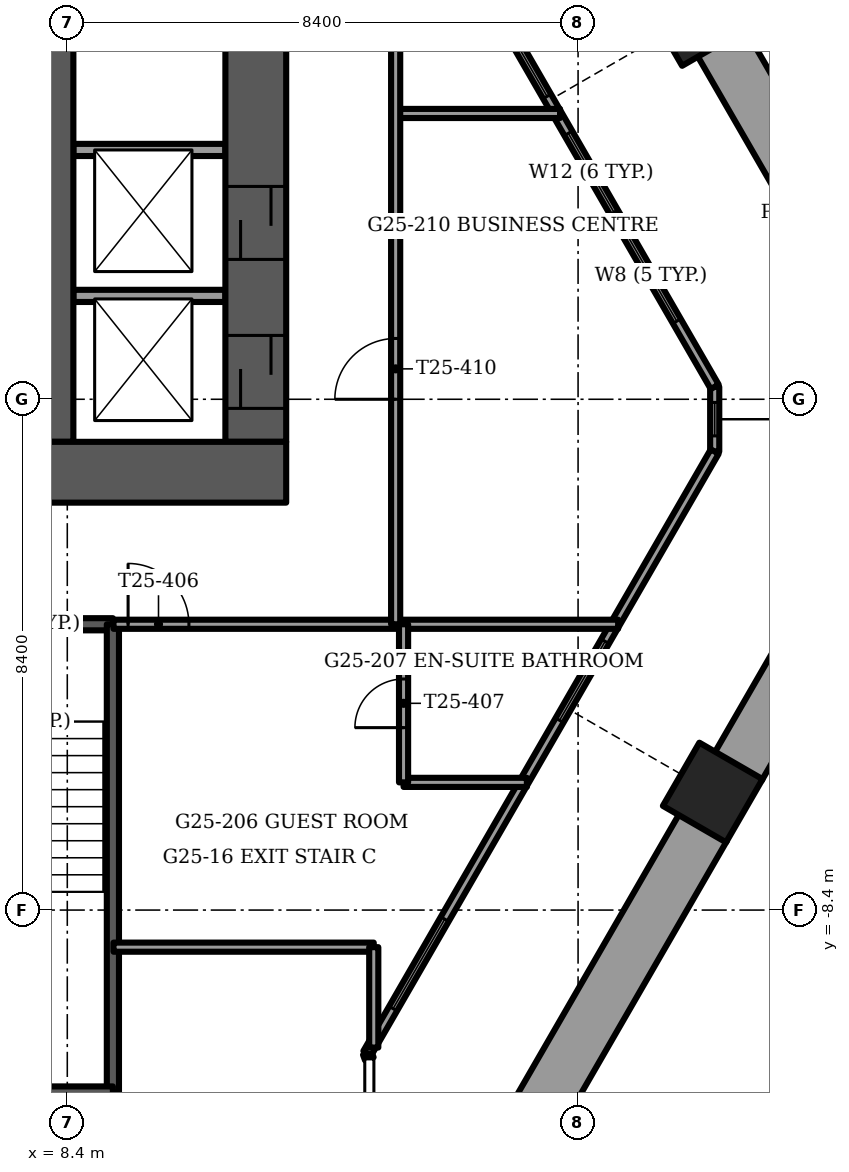
"""IFC4 building model, lengths in metres.
Left out: names, types, materials, properties, quantities, classifications, styles, units other than length and angle.
Written with IfcOpenShell. Run it as: python <this file> out.ifc"""

import sys

from ifc_helpers import new_model, si_unit, direction, frame, frame_2d, origin, origin_2d, place, context, subcontext, project, spatial, rectangle, extrude, element, fill, save


model = new_model("IFC4")
c1 = context("Model", 3, precision=1e-05, world=origin(), true_north=direction((0.0, 1.0)))
c2 = subcontext(c1, "Body", "Model", "MODEL_VIEW")
j1 = project(units=[si_unit("LENGTHUNIT", "METRE"), si_unit("PLANEANGLEUNIT", "RADIAN")], contexts=[c1])
p1 = place(None, origin())
s1 = spatial("IfcSite", under=j1, at=p1, CompositionType="ELEMENT")
p2 = place(p1, origin())
s2 = spatial("IfcBuilding", under=s1, at=p2, CompositionType="ELEMENT")
p3 = place(p2, frame((0.0, 0.0, 100.5)))
s3 = spatial("IfcBuildingStorey", under=s2, at=p3, CompositionType="ELEMENT", Elevation=100.5)
for number, where, z_axis, x_axis in (
    (1, (19.014, -6.467, -1.2), (0.0, 0.0, 1.0), (-0.5, -0.866, 0.0)),
    (2, (18.731, 6.303, -1.2), (0.0, 0.0, 1.0), (0.5, -0.866, 0.0)),
):
    element("IfcColumn", number, at=place(p3, frame(where, z_axis=z_axis, x_axis=x_axis)), inside=s3, PredefinedType="COLUMN", context=c2, shape_type="SweptSolid", body=[
        extrude(rectangle(XDim=1.2, YDim=1.2, at=origin_2d()), origin(), (0.0, 0.0, 1.0), 3.75),
    ])
p4 = place(p3, frame((-12.0, -1.2, -0.3), z_axis=(0.0, 0.0, 1.0), x_axis=(1.0, 0.0, 0.0)))
e3 = element("IfcWall", 3, at=p4, inside=s3, PredefinedType="SHEAR", context=c2, shape_type="SweptSolid", body=[
    extrude(rectangle(XDim=24.0, YDim=1.0, at=frame_2d((12.0, 0.0))), origin(), (0.0, 0.0, 1.0), 3.75),
])
p5 = place(p4, frame((11.2, 0.0, 0.0)))
e4 = element("IfcOpeningElement", 4, at=p5, cuts=e3, PredefinedType="OPENING", context=c2, shape_type="SweptSolid", body=[
    extrude(rectangle(XDim=1.6, YDim=2.1, at=frame_2d((0.8, 1.05))), frame((0.0, 0.5, 0.0), z_axis=(0.0, -1.0, 0.0), x_axis=(1.0, 0.0, 0.0)), (0.0, 0.0, 1.0), 1.0),
])
p6 = place(p3, frame((8.1, -0.7, -0.3), z_axis=(0.0, 0.0, 1.0), x_axis=(0.0, 1.0, 0.0)))
e5 = element("IfcWall", 5, at=p6, inside=s3, PredefinedType="SHEAR", context=c2, shape_type="SweptSolid", body=[
    extrude(rectangle(XDim=9.4, YDim=0.8, at=frame_2d((4.7, 0.0))), origin(), (0.0, 0.0, 1.0), 3.75),
])
p7 = place(p6, frame((7.95, 0.0, 0.0)))
e6 = element("IfcOpeningElement", 6, at=p7, cuts=e5, PredefinedType="OPENING", context=c2, shape_type="SweptSolid", body=[
    extrude(rectangle(XDim=1.1, YDim=2.1, at=frame_2d((0.55, 1.05))), frame((0.0, 0.4, 0.0), z_axis=(0.0, -1.0, 0.0), x_axis=(1.0, 0.0, 0.0)), (0.0, 0.0, 1.0), 0.8),
])
p8 = place(p3, frame((11.5, -0.7, -0.3), z_axis=(0.0, 0.0, 1.0), x_axis=(0.0, 1.0, 0.0)))
e7 = element("IfcWall", 7, at=p8, inside=s3, PredefinedType="SHEAR", context=c2, shape_type="SweptSolid", body=[
    extrude(rectangle(XDim=9.4, YDim=1.0, at=frame_2d((4.7, 0.0))), origin(), (0.0, 0.0, 1.0), 3.75),
])
p9 = place(p8, frame((8.15, 0.0, 0.0)))
e8 = element("IfcOpeningElement", 8, at=p9, cuts=e7, PredefinedType="OPENING", context=c2, shape_type="SweptSolid", body=[
    extrude(rectangle(XDim=1.1, YDim=2.1, at=frame_2d((0.55, 1.05))), frame((0.0, 0.5, 0.0), z_axis=(0.0, -1.0, 0.0), x_axis=(1.0, 0.0, 0.0)), (0.0, 0.0, 1.0), 1.0),
])
p10 = place(p8, frame((0.55, 0.0, 0.0)))
e9 = element("IfcOpeningElement", 9, at=p10, cuts=e7, PredefinedType="OPENING", context=c2, shape_type="SweptSolid", body=[
    extrude(rectangle(XDim=1.2, YDim=2.1, at=frame_2d((0.6, 1.05))), frame((0.0, 0.5, 0.0), z_axis=(0.0, -1.0, 0.0), x_axis=(1.0, 0.0, 0.0)), (0.0, 0.0, 1.0), 1.0),
])
p11 = place(p8, frame((3.0, 0.0, 0.0)))
e10 = element("IfcOpeningElement", 10, at=p11, cuts=e7, PredefinedType="OPENING", context=c2, shape_type="SweptSolid", body=[
    extrude(rectangle(XDim=1.2, YDim=2.1, at=frame_2d((0.6, 1.05))), frame((0.0, 0.5, 0.0), z_axis=(0.0, -1.0, 0.0), x_axis=(1.0, 0.0, 0.0)), (0.0, 0.0, 1.0), 1.0),
])
p12 = place(p3, frame((15.522, -12.815, 0.0), z_axis=(0.0, 0.0, 1.0), x_axis=(0.499999023957, 0.866025967302, 0.0)))
e11 = element("IfcWall", 11, at=p12, inside=s3, PredefinedType="PARAPET", context=c2, shape_type="SweptSolid", body=[
    extrude(rectangle(XDim=6.673, YDim=0.9, at=frame_2d((3.337, 0.0))), origin(), (0.0, 0.0, 1.0), 1.1),
])
p13 = place(p3, frame((19.429, -6.048, 0.0), z_axis=(0.0, 0.0, 1.0), x_axis=(0.500001626982, 0.866024464444, 0.0)))
e12 = element("IfcWall", 12, at=p13, inside=s3, PredefinedType="PARAPET", context=c2, shape_type="SweptSolid", body=[
    extrude(rectangle(XDim=5.955, YDim=0.9, at=frame_2d((2.978, 0.0))), origin(), (0.0, 0.0, 1.0), 1.1),
])
p14 = place(p3, frame((22.406, 0.236, 0.0), z_axis=(0.0, 0.0, 1.0), x_axis=(-0.500000042739, 0.866025379109, 0.0)))
e13 = element("IfcWall", 13, at=p14, inside=s3, PredefinedType="PARAPET", context=c2, shape_type="SweptSolid", body=[
    extrude(rectangle(XDim=6.522, YDim=0.9, at=frame_2d((3.261, 0.0))), origin(), (0.0, 0.0, 1.0), 1.1),
])
p15 = place(p3, frame((13.334, -10.755, 0.0), z_axis=(0.0, 0.0, 1.0), x_axis=(0.499999897272, 0.866025463095, 0.0)))
e14 = element("IfcWall", 14, at=p15, inside=s3, PredefinedType="SOLIDWALL", context=c2, shape_type="SweptSolid", body=[
    extrude(rectangle(XDim=11.426, YDim=0.15, at=frame_2d((5.713, 0.0))), origin(), (0.0, 0.0, 1.0), 3.45),
])
p16 = place(p15, frame((0.847, 0.0, 0.15)))
e15 = element("IfcOpeningElement", 15, at=p16, cuts=e14, PredefinedType="OPENING", context=c2, shape_type="SweptSolid", body=[
    extrude(rectangle(XDim=1.7, YDim=2.2, at=frame_2d((0.85, 1.1))), frame((0.0, 0.075, 0.0), z_axis=(0.0, -1.0, 0.0), x_axis=(1.0, 0.0, 0.0)), (0.0, 0.0, 1.0), 0.15),
])
p17 = place(p15, frame((6.322, 0.0, 0.15)))
e16 = element("IfcOpeningElement", 16, at=p17, cuts=e14, PredefinedType="OPENING", context=c2, shape_type="SweptSolid", body=[
    extrude(rectangle(XDim=1.5, YDim=2.2, at=frame_2d((0.75, 1.1))), frame((0.0, 0.075, 0.0), z_axis=(0.0, -1.0, 0.0), x_axis=(1.0, 0.0, 0.0)), (0.0, 0.0, 1.0), 0.15),
])
p18 = place(p3, frame((19.047, 0.205, 0.0), z_axis=(0.0, 0.0, 1.0), x_axis=(-0.499990645009, 0.866030804823, 0.0)))
e17 = element("IfcWall", 17, at=p18, inside=s3, PredefinedType="SOLIDWALL", context=c2, shape_type="SweptSolid", body=[
    extrude(rectangle(XDim=11.426, YDim=0.15, at=frame_2d((5.713, 0.0))), origin(), (0.0, 0.0, 1.0), 3.45),
])
p19 = place(p18, frame((1.246, 0.0, 0.15)))
e18 = element("IfcOpeningElement", 18, at=p19, cuts=e17, PredefinedType="OPENING", context=c2, shape_type="SweptSolid", body=[
    extrude(rectangle(XDim=1.7, YDim=2.2, at=frame_2d((0.85, 1.1))), frame((0.0, 0.075, 0.0), z_axis=(0.0, -1.0, 0.0), x_axis=(1.0, 0.0, 0.0)), (0.0, 0.0, 1.0), 0.15),
])
p20 = place(p18, frame((3.314, 0.0, 0.15)))
e19 = element("IfcOpeningElement", 19, at=p20, cuts=e17, PredefinedType="OPENING", context=c2, shape_type="SweptSolid", body=[
    extrude(rectangle(XDim=1.5, YDim=2.2, at=frame_2d((0.75, 1.1))), frame((0.0, 0.075, 0.0), z_axis=(0.0, -1.0, 0.0), x_axis=(1.0, 0.0, 0.0)), (0.0, 0.0, 1.0), 0.15),
])
p21 = place(p18, frame((5.514, 0.0, 0.15)))
e20 = element("IfcOpeningElement", 20, at=p21, cuts=e17, PredefinedType="OPENING", context=c2, shape_type="SweptSolid", body=[
    extrude(rectangle(XDim=1.7, YDim=2.2, at=frame_2d((0.85, 1.1))), frame((0.0, 0.075, 0.0), z_axis=(0.0, -1.0, 0.0), x_axis=(1.0, 0.0, 0.0)), (0.0, 0.0, 1.0), 0.15),
])
p22 = place(p18, frame((7.546, 0.0, 0.15)))
e21 = element("IfcOpeningElement", 21, at=p22, cuts=e17, PredefinedType="OPENING", context=c2, shape_type="SweptSolid", body=[
    extrude(rectangle(XDim=1.5, YDim=2.2, at=frame_2d((0.75, 1.1))), frame((0.0, 0.075, 0.0), z_axis=(0.0, -1.0, 0.0), x_axis=(1.0, 0.0, 0.0)), (0.0, 0.0, 1.0), 0.15),
])
p23 = place(p3, frame((19.047, -0.86, 0.0), z_axis=(0.0, 0.0, 1.0), x_axis=(0.0, 1.0, 0.0)))
e22 = element("IfcWall", 22, at=p23, inside=s3, PredefinedType="SOLIDWALL", context=c2, shape_type="SweptSolid", body=[
    extrude(rectangle(XDim=1.065, YDim=0.15, at=frame_2d((0.532, 0.0))), origin(), (0.0, 0.0, 1.0), 3.45),
])
p24 = place(p23, frame((0.258, 0.0, 0.15)))
e23 = element("IfcOpeningElement", 23, at=p24, cuts=e22, PredefinedType="OPENING", context=c2, shape_type="SweptSolid", body=[
    extrude(rectangle(XDim=0.55, YDim=2.2, at=frame_2d((0.275, 1.1))), frame((0.0, 0.075, 0.0), z_axis=(0.0, -1.0, 0.0), x_axis=(1.0, 0.0, 0.0)), (0.0, 0.0, 1.0), 0.15),
])
p25 = place(p3, frame((13.334, -10.755, 0.0), z_axis=(0.0, 0.0, 1.0), x_axis=(0.337751931921, -0.941235163221, 0.0)))
e24 = element("IfcWall", 24, at=p25, inside=s3, PredefinedType="SOLIDWALL", context=c2, shape_type="SweptSolid", body=[
    extrude(rectangle(XDim=0.098, YDim=0.15, at=frame_2d((0.049, 0.0))), origin(), (0.0, 0.0, 1.0), 3.45),
])
p26 = place(p3, frame((5.8, -3.7, -0.3), z_axis=(0.0, 0.0, 1.0), x_axis=(1.0, 0.0, 0.0)))
e25 = element("IfcWall", 25, at=p26, inside=s3, PredefinedType="SOLIDWALL", context=c2, shape_type="SweptSolid", body=[
    extrude(rectangle(XDim=3.35, YDim=0.2, at=frame_2d((1.675, 0.0))), origin(), (0.0, 0.0, 1.0), 3.75),
])
p27 = place(p26, frame((1.125, 0.0, 0.0)))
e26 = element("IfcOpeningElement", 26, at=p27, cuts=e25, PredefinedType="OPENING", context=c2, shape_type="SweptSolid", body=[
    extrude(rectangle(XDim=1.1, YDim=2.1, at=frame_2d((0.55, 1.05))), frame((0.0, 0.1, 0.0), z_axis=(0.0, -1.0, 0.0), x_axis=(1.0, 0.0, 0.0)), (0.0, 0.0, 1.0), 0.2),
])
p28 = place(p3, frame((9.15, -3.7, -0.3), z_axis=(0.0, 0.0, 1.0), x_axis=(0.0, -1.0, 0.0)))
e27 = element("IfcWall", 27, at=p28, inside=s3, PredefinedType="SOLIDWALL", context=c2, shape_type="SweptSolid", body=[
    extrude(rectangle(XDim=7.7, YDim=0.2, at=frame_2d((3.85, 0.0))), origin(), (0.0, 0.0, 1.0), 3.75),
])
p29 = place(p3, frame((5.8, -11.4, -0.3), z_axis=(0.0, 0.0, 1.0), x_axis=(1.0, 0.0, 0.0)))
e28 = element("IfcWall", 28, at=p29, inside=s3, PredefinedType="SOLIDWALL", context=c2, shape_type="SweptSolid", body=[
    extrude(rectangle(XDim=3.35, YDim=0.2, at=frame_2d((1.675, 0.0))), origin(), (0.0, 0.0, 1.0), 3.75),
])
for number, where, z_axis, x_axis in (
    (29, (8.5, 1.7, 0.0), (0.0, 0.0, 1.0), (1.0, 0.0, 0.0)),
    (30, (8.5, 4.1, 0.0), (0.0, 0.0, 1.0), (1.0, 0.0, 0.0)),
):
    element("IfcWall", number, at=place(p3, frame(where, z_axis=z_axis, x_axis=x_axis)), inside=s3, PredefinedType="PARTITIONING", context=c2, shape_type="SweptSolid", body=[
        extrude(rectangle(XDim=2.5, YDim=0.2, at=frame_2d((1.25, 0.0))), origin(), (0.0, 0.0, 1.0), 3.45),
    ])
p30 = place(p3, frame((9.16, -9.01, 0.0), z_axis=(0.0, 0.0, 1.0), x_axis=(1.0, 0.0, 0.0)))
e31 = element("IfcWall", 31, at=p30, inside=s3, PredefinedType="PARTITIONING", context=c2, shape_type="SweptSolid", body=[
    extrude(rectangle(XDim=4.28, YDim=0.15, at=frame_2d((2.14, 0.0))), origin(), (0.0, 0.0, 1.0), 3.45),
])
p31 = place(p3, frame((13.93, -6.3, 0.0), z_axis=(0.0, 0.0, 1.0), x_axis=(1.0, 0.0, 0.0)))
e32 = element("IfcWall", 32, at=p31, inside=s3, PredefinedType="PARTITIONING", context=c2, shape_type="SweptSolid", body=[
    extrude(rectangle(XDim=2.028, YDim=0.15, at=frame_2d((1.014, 0.0))), origin(), (0.0, 0.0, 1.0), 3.45),
])
p32 = place(p3, frame((9.16, -3.7, 0.0), z_axis=(0.0, 0.0, 1.0), x_axis=(1.0, 0.0, 0.0)))
e33 = element("IfcWall", 33, at=p32, inside=s3, PredefinedType="PARTITIONING", context=c2, shape_type="SweptSolid", body=[
    extrude(rectangle(XDim=8.299, YDim=0.15, at=frame_2d((4.149, 0.0))), origin(), (0.0, 0.0, 1.0), 3.45),
])
p33 = place(p32, frame((0.24, 0.0, 0.0)))
e34 = element("IfcOpeningElement", 34, at=p33, cuts=e33, PredefinedType="OPENING", context=c2, shape_type="SweptSolid", body=[
    extrude(rectangle(XDim=1.0, YDim=2.1, at=frame_2d((0.5, 1.05))), frame((0.0, 0.075, 0.0), z_axis=(0.0, -1.0, 0.0), x_axis=(1.0, 0.0, 0.0)), (0.0, 0.0, 1.0), 0.15),
])
p34 = place(p3, frame((13.8, 4.7, 0.0), z_axis=(0.0, 0.0, 1.0), x_axis=(1.0, 0.0, 0.0)))
e35 = element("IfcWall", 35, at=p34, inside=s3, PredefinedType="PARTITIONING", context=c2, shape_type="SweptSolid", body=[
    extrude(rectangle(XDim=2.704, YDim=0.15, at=frame_2d((1.352, 0.0))), origin(), (0.0, 0.0, 1.0), 3.45),
])
p35 = place(p3, frame((13.93, -6.3, 0.0), z_axis=(0.0, 0.0, 1.0), x_axis=(0.0, 1.0, 0.0)))
e36 = element("IfcWall", 36, at=p35, inside=s3, PredefinedType="PARTITIONING", context=c2, shape_type="SweptSolid", body=[
    extrude(rectangle(XDim=2.6, YDim=0.15, at=frame_2d((1.3, 0.0))), origin(), (0.0, 0.0, 1.0), 3.45),
])
p36 = place(p35, frame((0.9, 0.0, 0.0)))
e37 = element("IfcOpeningElement", 37, at=p36, cuts=e36, PredefinedType="OPENING", context=c2, shape_type="SweptSolid", body=[
    extrude(rectangle(XDim=0.8, YDim=2.1, at=frame_2d((0.4, 1.05))), frame((0.0, 0.075, 0.0), z_axis=(0.0, -1.0, 0.0), x_axis=(1.0, 0.0, 0.0)), (0.0, 0.0, 1.0), 0.15),
])
p37 = place(p3, frame((13.8, -3.7, 0.0), z_axis=(0.0, 0.0, 1.0), x_axis=(0.0, 1.0, 0.0)))
e38 = element("IfcWall", 38, at=p37, inside=s3, PredefinedType="PARTITIONING", context=c2, shape_type="SweptSolid", body=[
    extrude(rectangle(XDim=13.083, YDim=0.15, at=frame_2d((6.542, 0.0))), origin(), (0.0, 0.0, 1.0), 3.45),
])
p38 = place(p37, frame((3.7, 0.0, 0.0)))
e39 = element("IfcOpeningElement", 39, at=p38, cuts=e38, PredefinedType="OPENING", context=c2, shape_type="SweptSolid", body=[
    extrude(rectangle(XDim=1.0, YDim=2.1, at=frame_2d((0.5, 1.05))), frame((0.0, 0.075, 0.0), z_axis=(0.0, -1.0, 0.0), x_axis=(1.0, 0.0, 0.0)), (0.0, 0.0, 1.0), 0.15),
])
p39 = place(p37, frame((10.12, 0.0, 0.0)))
e40 = element("IfcOpeningElement", 40, at=p39, cuts=e38, PredefinedType="OPENING", context=c2, shape_type="SweptSolid", body=[
    extrude(rectangle(XDim=1.0, YDim=2.1, at=frame_2d((0.5, 1.05))), frame((0.0, 0.075, 0.0), z_axis=(0.0, -1.0, 0.0), x_axis=(1.0, 0.0, 0.0)), (0.0, 0.0, 1.0), 0.15),
])
p40 = place(p3, frame((13.44, -10.661, 0.0), z_axis=(0.0, 0.0, 1.0), x_axis=(0.0, 1.0, 0.0)))
e41 = element("IfcWall", 41, at=p40, inside=s3, PredefinedType="PARTITIONING", context=c2, shape_type="SweptSolid", body=[
    extrude(rectangle(XDim=1.651, YDim=0.15, at=frame_2d((0.825, 0.0))), origin(), (0.0, 0.0, 1.0), 3.45),
])
p41 = place(p16, origin())
e42 = element("IfcWindow", 42, at=p41, inside=s3, PartitioningType="SINGLE_PANEL", PredefinedType="WINDOW", context=c2, shape_type="SweptSolid", body=[
    extrude(rectangle(XDim=1.7, YDim=2.2, at=frame_2d((0.85, 1.1))), frame((0.0, 0.03, 0.0), z_axis=(0.0, -1.0, 0.0), x_axis=(1.0, 0.0, 0.0)), (0.0, 0.0, 1.0), 0.06),
])
fill(e15, e42)
p42 = place(p17, origin())
e43 = element("IfcWindow", 43, at=p42, inside=s3, PartitioningType="SINGLE_PANEL", PredefinedType="WINDOW", context=c2, shape_type="SweptSolid", body=[
    extrude(rectangle(XDim=1.5, YDim=2.2, at=frame_2d((0.75, 1.1))), frame((0.0, 0.03, 0.0), z_axis=(0.0, -1.0, 0.0), x_axis=(1.0, 0.0, 0.0)), (0.0, 0.0, 1.0), 0.06),
])
fill(e16, e43)
p43 = place(p19, origin())
e44 = element("IfcWindow", 44, at=p43, inside=s3, PartitioningType="SINGLE_PANEL", PredefinedType="WINDOW", context=c2, shape_type="SweptSolid", body=[
    extrude(rectangle(XDim=1.7, YDim=2.2, at=frame_2d((0.85, 1.1))), frame((0.0, 0.03, 0.0), z_axis=(0.0, -1.0, 0.0), x_axis=(1.0, 0.0, 0.0)), (0.0, 0.0, 1.0), 0.06),
])
fill(e18, e44)
p44 = place(p20, origin())
e45 = element("IfcWindow", 45, at=p44, inside=s3, PartitioningType="SINGLE_PANEL", PredefinedType="WINDOW", context=c2, shape_type="SweptSolid", body=[
    extrude(rectangle(XDim=1.5, YDim=2.2, at=frame_2d((0.75, 1.1))), frame((0.0, 0.03, 0.0), z_axis=(0.0, -1.0, 0.0), x_axis=(1.0, 0.0, 0.0)), (0.0, 0.0, 1.0), 0.06),
])
fill(e19, e45)
p45 = place(p21, origin())
e46 = element("IfcWindow", 46, at=p45, inside=s3, PartitioningType="SINGLE_PANEL", PredefinedType="WINDOW", context=c2, shape_type="SweptSolid", body=[
    extrude(rectangle(XDim=1.7, YDim=2.2, at=frame_2d((0.85, 1.1))), frame((0.0, 0.03, 0.0), z_axis=(0.0, -1.0, 0.0), x_axis=(1.0, 0.0, 0.0)), (0.0, 0.0, 1.0), 0.06),
])
fill(e20, e46)
p46 = place(p24, origin())
e47 = element("IfcWindow", 47, at=p46, inside=s3, PartitioningType="SINGLE_PANEL", PredefinedType="WINDOW", context=c2, shape_type="SweptSolid", body=[
    extrude(rectangle(XDim=0.55, YDim=2.2, at=frame_2d((0.275, 1.1))), frame((0.0, 0.03, 0.0), z_axis=(0.0, -1.0, 0.0), x_axis=(1.0, 0.0, 0.0)), (0.0, 0.0, 1.0), 0.06),
])
fill(e23, e47)
p47 = place(p10, origin())
e48 = element("IfcDoor", 48, at=p47, inside=s3, OperationType="SLIDING_TO_LEFT", PredefinedType="DOOR", context=c2, shape_type="SweptSolid", body=[
    extrude(rectangle(XDim=1.2, YDim=2.1, at=frame_2d((0.6, 1.05))), frame((0.0, 0.025, 0.0), z_axis=(0.0, -1.0, 0.0), x_axis=(1.0, 0.0, 0.0)), (0.0, 0.0, 1.0), 0.05),
])
fill(e9, e48)
p48 = place(p11, origin())
e49 = element("IfcDoor", 49, at=p48, inside=s3, OperationType="SLIDING_TO_LEFT", PredefinedType="DOOR", context=c2, shape_type="SweptSolid", body=[
    extrude(rectangle(XDim=1.2, YDim=2.1, at=frame_2d((0.6, 1.05))), frame((0.0, 0.025, 0.0), z_axis=(0.0, -1.0, 0.0), x_axis=(1.0, 0.0, 0.0)), (0.0, 0.0, 1.0), 0.05),
])
fill(e10, e49)
p49 = place(p33, origin())
e50 = element("IfcDoor", 50, at=p49, inside=s3, OperationType="SINGLE_SWING_LEFT", PredefinedType="DOOR", context=c2, shape_type="SweptSolid", body=[
    extrude(rectangle(XDim=1.0, YDim=2.1, at=frame_2d((0.5, 1.05))), frame((0.0, 0.025, 0.0), z_axis=(0.0, -1.0, 0.0), x_axis=(1.0, 0.0, 0.0)), (0.0, 0.0, 1.0), 0.05),
])
fill(e34, e50)
p50 = place(p36, origin())
e51 = element("IfcDoor", 51, at=p50, inside=s3, OperationType="SINGLE_SWING_RIGHT", PredefinedType="DOOR", context=c2, shape_type="SweptSolid", body=[
    extrude(rectangle(XDim=0.8, YDim=2.1, at=frame_2d((0.4, 1.05))), frame((0.0, 0.025, 0.0), z_axis=(0.0, -1.0, 0.0), x_axis=(1.0, 0.0, 0.0)), (0.0, 0.0, 1.0), 0.05),
])
fill(e37, e51)
p51 = place(p38, origin())
e52 = element("IfcDoor", 52, at=p51, inside=s3, OperationType="SINGLE_SWING_LEFT", PredefinedType="DOOR", context=c2, shape_type="SweptSolid", body=[
    extrude(rectangle(XDim=1.0, YDim=2.1, at=frame_2d((0.5, 1.05))), frame((0.0, 0.025, 0.0), z_axis=(0.0, -1.0, 0.0), x_axis=(1.0, 0.0, 0.0)), (0.0, 0.0, 1.0), 0.05),
])
fill(e39, e52)
save(model, sys.argv[1])
